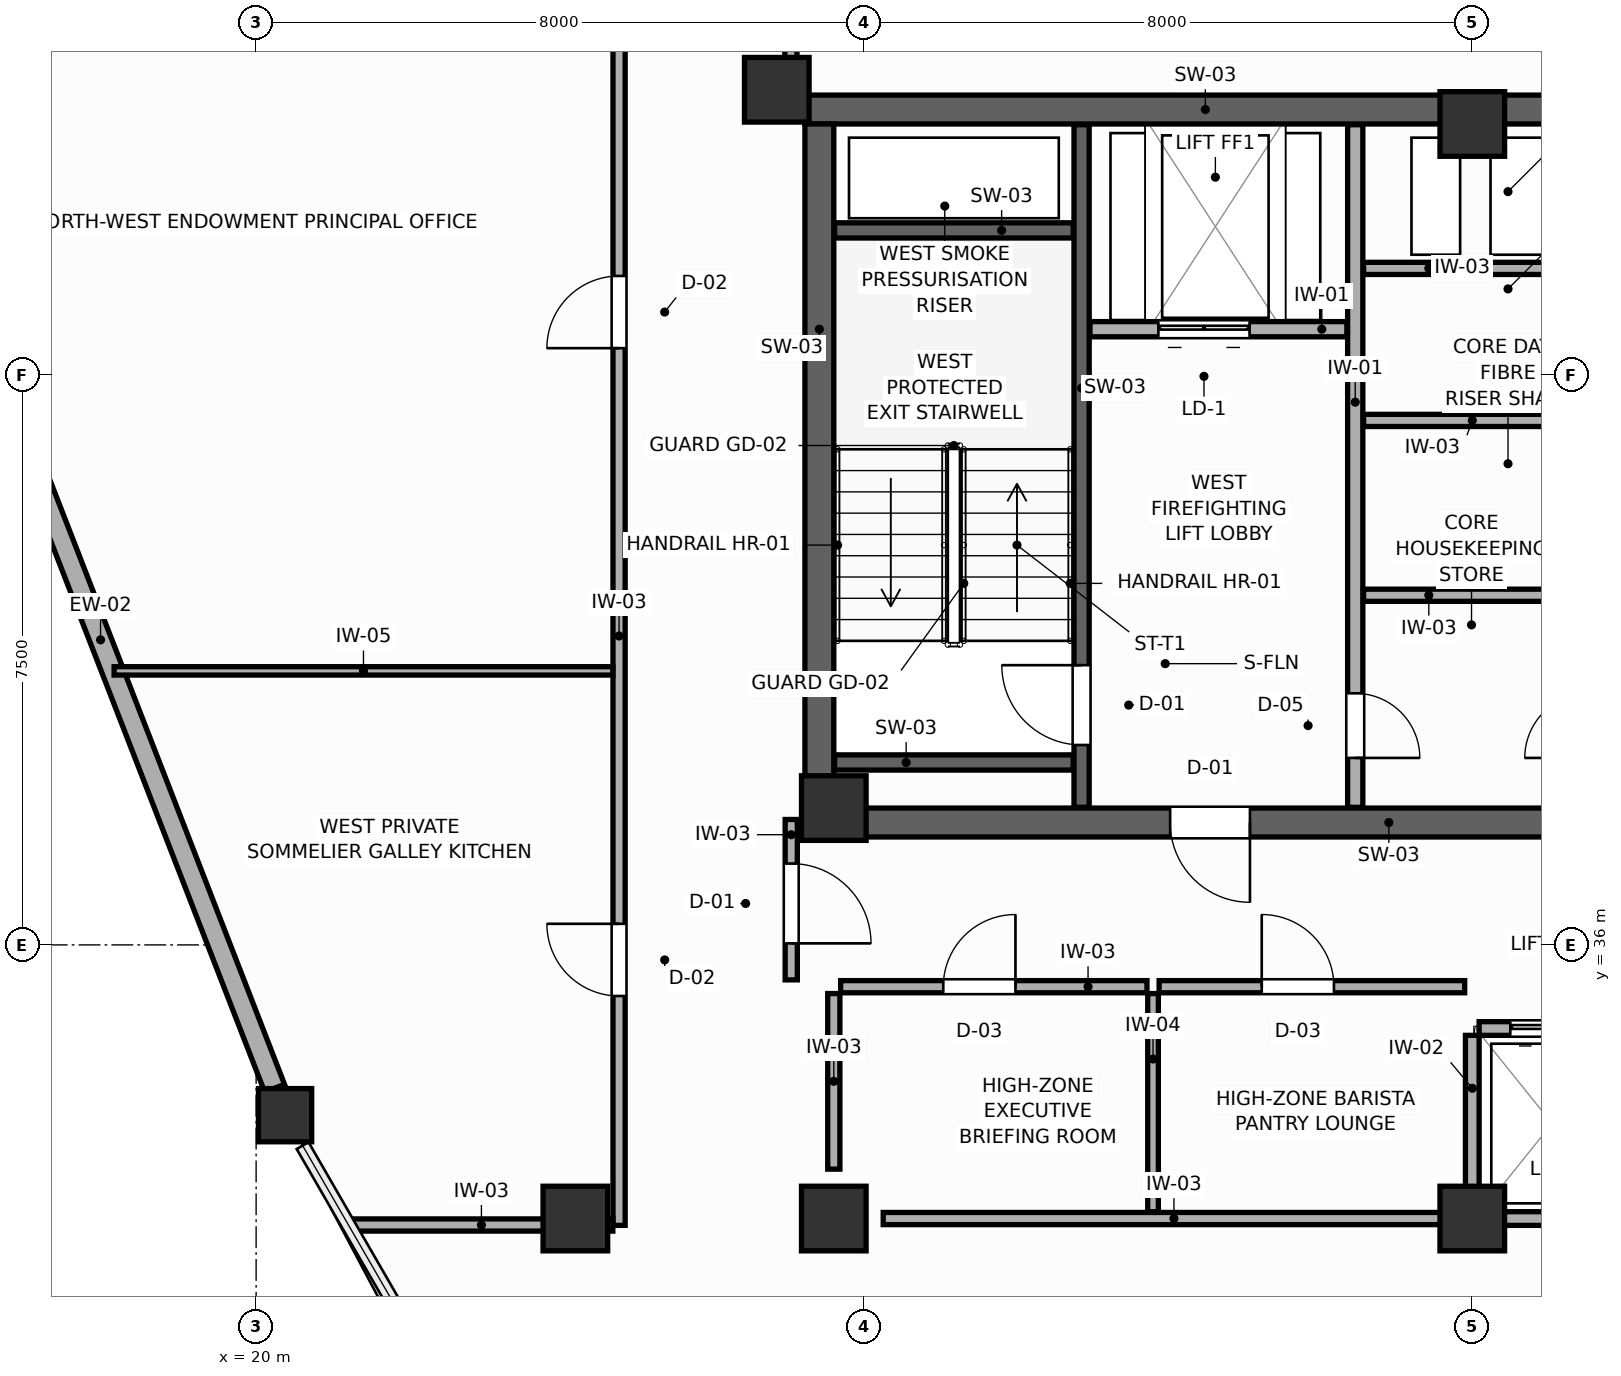
"""IFC4 building model, lengths in metres.
Left out: names, types, materials, properties, quantities, classifications, styles, units other than length and angle.
Written with IfcOpenShell. Run it as: python <this file> out.ifc"""

import sys

from ifc_helpers import new_model, si_unit, direction, frame, frame_2d, origin, origin_2d, place, context, subcontext, project, spatial, rectangle, extrude, source, transform, mapped, element, fill, save


model = new_model("IFC4")
c1 = context("Model", 3, precision=1e-05, world=origin(), true_north=direction((0.0, 1.0)))
c2 = subcontext(c1, "Body", "Model", "MODEL_VIEW")
j1 = project(units=[si_unit("LENGTHUNIT", "METRE"), si_unit("PLANEANGLEUNIT", "RADIAN")], contexts=[c1])
p1 = place(None, origin())
s1 = spatial("IfcSite", under=j1, at=p1, CompositionType="ELEMENT")
p2 = place(p1, origin())
s2 = spatial("IfcBuilding", under=s1, at=p2, CompositionType="ELEMENT")
p3 = place(p2, frame((0.0, 0.0, 264.6)))
s3 = spatial("IfcBuildingStorey", under=s2, at=p3, CompositionType="ELEMENT", Elevation=264.6)
p4 = place(p3, frame((27.22, 46.99, 0.0), z_axis=(0.0, 0.0, 1.0), x_axis=(1.0, 0.0, 0.0)))
e1 = element("IfcWall", 1, at=p4, inside=s3, PredefinedType="SHEAR", context=c2, shape_type="SweptSolid", body=[
    extrude(rectangle(XDim=17.56, YDim=0.38, at=frame_2d((8.78, 0.0))), origin(), (0.0, 0.0, 1.0), 3.6),
])
p5 = place(p3, frame((27.22, 37.61, 0.0), z_axis=(0.0, 0.0, 1.0), x_axis=(1.0, 0.0, 0.0)))
e2 = element("IfcWall", 2, at=p5, inside=s3, PredefinedType="SHEAR", context=c2, shape_type="SweptSolid", body=[
    extrude(rectangle(XDim=17.56, YDim=0.38, at=frame_2d((8.78, 0.0))), origin(), (0.0, 0.0, 1.0), 3.6),
])
p6 = place(p5, frame((4.805, 0.0, 0.0)))
e3 = element("IfcOpeningElement", 3, at=p6, cuts=e2, PredefinedType="OPENING", context=c2, shape_type="SweptSolid", body=[
    extrude(rectangle(XDim=1.05, YDim=2.1, at=frame_2d((0.525, 1.05))), frame((0.0, 0.2, 0.0), z_axis=(0.0, -1.0, 0.0), x_axis=(1.0, 0.0, 0.0)), (0.0, 0.0, 1.0), 0.4),
])
p7 = place(p5, frame((11.705, 0.0, 0.0)))
e4 = element("IfcOpeningElement", 4, at=p7, cuts=e2, PredefinedType="OPENING", context=c2, shape_type="SweptSolid", body=[
    extrude(rectangle(XDim=1.05, YDim=2.1, at=frame_2d((0.525, 1.05))), frame((0.0, 0.2, 0.0), z_axis=(0.0, -1.0, 0.0), x_axis=(1.0, 0.0, 0.0)), (0.0, 0.0, 1.0), 0.4),
])
p8 = place(p3, frame((27.41, 37.8, 0.0), z_axis=(0.0, 0.0, 1.0), x_axis=(0.0, 1.0, 0.0)))
e5 = element("IfcWall", 5, at=p8, inside=s3, PredefinedType="SHEAR", context=c2, shape_type="SweptSolid", body=[
    extrude(rectangle(XDim=9.0, YDim=0.38, at=frame_2d((4.5, 0.0))), origin(), (0.0, 0.0, 1.0), 3.6),
])
m1 = source(origin(), c2, "Body", "SweptSolid", [
    extrude(rectangle(XDim=0.85, YDim=0.85, at=origin_2d()), origin(), (0.0, 0.0, 1.0), 3.6),
])
for number, where, z_axis, x_axis in (
    (6, (26.85, 47.25, 0.0), (0.0, 0.0, 1.0), (1.0, 0.0, 0.0)),
    (7, (27.6, 37.8, 0.0), (0.0, 0.0, 1.0), (1.0, 0.0, 0.0)),
    (8, (27.6, 32.4, 0.0), (0.0, 0.0, 1.0), (1.0, 0.0, 0.0)),
    (9, (36.0, 46.8, 0.0), (0.0, 0.0, 1.0), (1.0, 0.0, 0.0)),
    (10, (36.0, 32.4, 0.0), (0.0, 0.0, 1.0), (1.0, 0.0, 0.0)),
    (11, (24.2, 32.4, 0.0), (0.0, 0.0, 1.0), (1.0, 0.0, 0.0)),
):
    element("IfcColumn", number, at=place(p3, frame(where, z_axis=z_axis, x_axis=x_axis)), inside=s3, PredefinedType="COLUMN", context=c2, shape_type="MappedRepresentation", body=[
        mapped(m1, transform((0.0, 0.0, 0.0), scale=1.0)),
    ])
m2 = source(origin(), c2, "Body", "SweptSolid", [
    extrude(rectangle(XDim=0.7, YDim=0.7, at=origin_2d()), origin(), (0.0, 0.0, 1.0), 3.6),
])
p9 = place(p3, frame((20.381, 33.76, 0.0), z_axis=(0.0, 0.0, 1.0), x_axis=(1.0, 0.0, 0.0)))
e12 = element("IfcColumn", 12, at=p9, inside=s3, PredefinedType="COLUMN", context=c2, shape_type="MappedRepresentation", body=[
    mapped(m2, transform((0.0, 0.0, 0.0), scale=1.0)),
])
p10 = place(p3, frame((15.664, 45.911, 0.0), z_axis=(0.0, 0.0, 1.0), x_axis=(0.3618810561, -0.932224276253, 0.0)))
e13 = element("IfcWall", 13, at=p10, inside=s3, PredefinedType="SOLIDWALL", context=c2, shape_type="SweptSolid", body=[
    extrude(rectangle(XDim=12.654, YDim=0.28, at=frame_2d((6.327, 0.0))), origin(), (0.0, 0.0, 1.0), 3.05),
])
p11 = place(p3, frame((30.86, 37.81, 0.0), z_axis=(0.0, 0.0, 1.0), x_axis=(0.0, 1.0, 0.0)))
e14 = element("IfcWall", 14, at=p11, inside=s3, PredefinedType="SHEAR", context=c2, shape_type="SweptSolid", body=[
    extrude(rectangle(XDim=8.98, YDim=0.2, at=frame_2d((4.49, 0.0))), origin(), (0.0, 0.0, 1.0), 3.6),
])
p12 = place(p11, frame((0.82, 0.0, 0.0)))
e15 = element("IfcOpeningElement", 15, at=p12, cuts=e14, PredefinedType="OPENING", context=c2, shape_type="SweptSolid", body=[
    extrude(rectangle(XDim=1.05, YDim=2.1, at=frame_2d((0.525, 1.05))), frame((0.0, 0.11, 0.0), z_axis=(0.0, -1.0, 0.0), x_axis=(1.0, 0.0, 0.0)), (0.0, 0.0, 1.0), 0.22),
])
for number, where, z_axis, x_axis in (
    (16, (27.61, 45.4, 0.0), (0.0, 0.0, 1.0), (1.0, 0.0, 0.0)),
    (17, (27.61, 38.4, 0.0), (0.0, 0.0, 1.0), (1.0, 0.0, 0.0)),
):
    element("IfcWall", number, at=place(p3, frame(where, z_axis=z_axis, x_axis=x_axis)), inside=s3, PredefinedType="SHEAR", context=c2, shape_type="SweptSolid", body=[
        extrude(rectangle(XDim=3.14, YDim=0.2, at=frame_2d((1.57, 0.0))), origin(), (0.0, 0.0, 1.0), 3.6),
    ])
p13 = place(p3, frame((30.97, 44.1, 0.0), z_axis=(0.0, 0.0, 1.0), x_axis=(1.0, 0.0, 0.0)))
e18 = element("IfcWall", 18, at=p13, inside=s3, PredefinedType="PARTITIONING", context=c2, shape_type="SweptSolid", body=[
    extrude(rectangle(XDim=3.38, YDim=0.2, at=frame_2d((1.69, 0.0))), origin(), (0.0, 0.0, 1.0), 3.41),
])
p14 = place(p13, frame((0.9, 0.0, 0.0)))
e19 = element("IfcOpeningElement", 19, at=p14, cuts=e18, PredefinedType="OPENING", context=c2, shape_type="SweptSolid", body=[
    extrude(rectangle(XDim=1.2, YDim=2.1, at=frame_2d((0.6, 1.05))), frame((0.0, 0.11, 0.0), z_axis=(0.0, -1.0, 0.0), x_axis=(1.0, 0.0, 0.0)), (0.0, 0.0, 1.0), 0.22),
])
p15 = place(p3, frame((34.46, 37.81, 0.0), z_axis=(0.0, 0.0, 1.0), x_axis=(0.0, 1.0, 0.0)))
e20 = element("IfcWall", 20, at=p15, inside=s3, PredefinedType="PARTITIONING", context=c2, shape_type="SweptSolid", body=[
    extrude(rectangle(XDim=8.98, YDim=0.2, at=frame_2d((4.49, 0.0))), origin(), (0.0, 0.0, 1.0), 3.41),
])
p16 = place(p15, frame((0.65, 0.0, 0.0)))
e21 = element("IfcOpeningElement", 21, at=p16, cuts=e20, PredefinedType="OPENING", context=c2, shape_type="SweptSolid", body=[
    extrude(rectangle(XDim=0.85, YDim=2.05, at=frame_2d((0.425, 1.025))), frame((0.0, 0.11, 0.0), z_axis=(0.0, -1.0, 0.0), x_axis=(1.0, 0.0, 0.0)), (0.0, 0.0, 1.0), 0.22),
])
for number, where, z_axis, x_axis in (
    (22, (34.57, 40.6, 0.0), (0.0, 0.0, 1.0), (1.0, 0.0, 0.0)),
    (23, (34.57, 42.9, 0.0), (0.0, 0.0, 1.0), (1.0, 0.0, 0.0)),
    (24, (34.57, 44.9, 0.0), (0.0, 0.0, 1.0), (1.0, 0.0, 0.0)),
):
    element("IfcWall", number, at=place(p3, frame(where, z_axis=z_axis, x_axis=x_axis)), inside=s3, PredefinedType="PARTITIONING", context=c2, shape_type="SweptSolid", body=[
        extrude(rectangle(XDim=2.86, YDim=0.16, at=frame_2d((1.43, 0.0))), origin(), (0.0, 0.0, 1.0), 3.41),
    ])
p17 = place(p3, frame((36.09, 34.9, 0.0), z_axis=(0.0, 0.0, 1.0), x_axis=(1.0, 0.0, 0.0)))
e25 = element("IfcWall", 25, at=p17, inside=s3, PredefinedType="PARTITIONING", context=c2, shape_type="SweptSolid", body=[
    extrude(rectangle(XDim=1.92, YDim=0.18, at=frame_2d((0.96, 0.0))), origin(), (0.0, 0.0, 1.0), 3.41),
])
p18 = place(p17, frame((0.41, 0.0, 0.0)))
e26 = element("IfcOpeningElement", 26, at=p18, cuts=e25, PredefinedType="OPENING", context=c2, shape_type="SweptSolid", body=[
    extrude(rectangle(XDim=1.1, YDim=2.1, at=frame_2d((0.55, 1.05))), frame((0.0, 0.1, 0.0), z_axis=(0.0, -1.0, 0.0), x_axis=(1.0, 0.0, 0.0)), (0.0, 0.0, 1.0), 0.2),
])
p19 = place(p3, frame((36.09, 32.4, 0.0), z_axis=(0.0, 0.0, 1.0), x_axis=(1.0, 0.0, 0.0)))
e27 = element("IfcWall", 27, at=p19, inside=s3, PredefinedType="PARTITIONING", context=c2, shape_type="SweptSolid", body=[
    extrude(rectangle(XDim=1.92, YDim=0.18, at=frame_2d((0.96, 0.0))), origin(), (0.0, 0.0, 1.0), 3.08),
])
p20 = place(p3, frame((36.0, 32.49, 0.0), z_axis=(0.0, 0.0, 1.0), x_axis=(0.0, 1.0, 0.0)))
e28 = element("IfcWall", 28, at=p20, inside=s3, PredefinedType="PARTITIONING", context=c2, shape_type="SweptSolid", body=[
    extrude(rectangle(XDim=2.32, YDim=0.18, at=frame_2d((1.16, 0.0))), origin(), (0.0, 0.0, 1.0), 3.41),
])
p21 = place(p3, frame((28.25, 32.4, 0.0), z_axis=(0.0, 0.0, 1.0), x_axis=(1.0, 0.0, 0.0)))
e29 = element("IfcWall", 29, at=p21, inside=s3, PredefinedType="PARTITIONING", context=c2, shape_type="SweptSolid", body=[
    extrude(rectangle(XDim=7.65, YDim=0.16, at=frame_2d((3.825, 0.0))), origin(), (0.0, 0.0, 1.0), 3.08),
])
p22 = place(p3, frame((27.6, 33.05, 0.0), z_axis=(0.0, 0.0, 1.0), x_axis=(0.0, 1.0, 0.0)))
e30 = element("IfcWall", 30, at=p22, inside=s3, PredefinedType="PARTITIONING", context=c2, shape_type="SweptSolid", body=[
    extrude(rectangle(XDim=2.31, YDim=0.16, at=frame_2d((1.155, 0.0))), origin(), (0.0, 0.0, 1.0), 3.41),
])
p23 = place(p3, frame((31.8, 32.49, 0.0), z_axis=(0.0, 0.0, 1.0), x_axis=(0.0, 1.0, 0.0)))
e31 = element("IfcWall", 31, at=p23, inside=s3, PredefinedType="PARTITIONING", context=c2, shape_type="SweptSolid", body=[
    extrude(rectangle(XDim=2.87, YDim=0.14, at=frame_2d((1.435, 0.0))), origin(), (0.0, 0.0, 1.0), 3.41),
])
p24 = place(p3, frame((27.69, 35.45, 0.0), z_axis=(0.0, 0.0, 1.0), x_axis=(1.0, 0.0, 0.0)))
e32 = element("IfcWall", 32, at=p24, inside=s3, PredefinedType="PARTITIONING", context=c2, shape_type="SweptSolid", body=[
    extrude(rectangle(XDim=4.03, YDim=0.16, at=frame_2d((2.015, 0.0))), origin(), (0.0, 0.0, 1.0), 3.41),
])
p25 = place(p24, frame((1.35, 0.0, 0.0)))
e33 = element("IfcOpeningElement", 33, at=p25, cuts=e32, PredefinedType="OPENING", context=c2, shape_type="SweptSolid", body=[
    extrude(rectangle(XDim=0.95, YDim=2.05, at=frame_2d((0.475, 1.025))), frame((0.0, 0.09, 0.0), z_axis=(0.0, -1.0, 0.0), x_axis=(1.0, 0.0, 0.0)), (0.0, 0.0, 1.0), 0.18),
])
p26 = place(p3, frame((31.88, 35.45, 0.0), z_axis=(0.0, 0.0, 1.0), x_axis=(1.0, 0.0, 0.0)))
e34 = element("IfcWall", 34, at=p26, inside=s3, PredefinedType="PARTITIONING", context=c2, shape_type="SweptSolid", body=[
    extrude(rectangle(XDim=4.02, YDim=0.16, at=frame_2d((2.01, 0.0))), origin(), (0.0, 0.0, 1.0), 3.41),
])
p27 = place(p26, frame((1.35, 0.0, 0.0)))
e35 = element("IfcOpeningElement", 35, at=p27, cuts=e34, PredefinedType="OPENING", context=c2, shape_type="SweptSolid", body=[
    extrude(rectangle(XDim=0.95, YDim=2.05, at=frame_2d((0.475, 1.025))), frame((0.0, 0.09, 0.0), z_axis=(0.0, -1.0, 0.0), x_axis=(1.0, 0.0, 0.0)), (0.0, 0.0, 1.0), 0.18),
])
p28 = place(p3, frame((27.04, 35.54, 0.0), z_axis=(0.0, 0.0, 1.0), x_axis=(0.0, 1.0, 0.0)))
e36 = element("IfcWall", 36, at=p28, inside=s3, PredefinedType="PARTITIONING", context=c2, shape_type="SweptSolid", body=[
    extrude(rectangle(XDim=2.11, YDim=0.16, at=frame_2d((1.055, 0.0))), origin(), (0.0, 0.0, 1.0), 3.41),
])
p29 = place(p28, frame((0.48, 0.0, 0.0)))
e37 = element("IfcOpeningElement", 37, at=p29, cuts=e36, PredefinedType="OPENING", context=c2, shape_type="SweptSolid", body=[
    extrude(rectangle(XDim=1.05, YDim=2.1, at=frame_2d((0.525, 1.05))), frame((0.0, 0.09, 0.0), z_axis=(0.0, -1.0, 0.0), x_axis=(1.0, 0.0, 0.0)), (0.0, 0.0, 1.0), 0.18),
])
p30 = place(p3, frame((24.775, 32.31, 0.0), z_axis=(0.0, 0.0, 1.0), x_axis=(0.0, 1.0, 0.0)))
e38 = element("IfcWall", 38, at=p30, inside=s3, PredefinedType="PARTITIONING", context=c2, shape_type="SweptSolid", body=[
    extrude(rectangle(XDim=17.489, YDim=0.16, at=frame_2d((8.745, 0.0))), origin(), (0.0, 0.0, 1.0), 3.41),
])
p31 = place(p30, frame((3.018, 0.0, 0.0)))
e39 = element("IfcOpeningElement", 39, at=p31, cuts=e38, PredefinedType="OPENING", context=c2, shape_type="SweptSolid", body=[
    extrude(rectangle(XDim=0.95, YDim=2.05, at=frame_2d((0.475, 1.025))), frame((0.0, 0.09, 0.0), z_axis=(0.0, -1.0, 0.0), x_axis=(1.0, 0.0, 0.0)), (0.0, 0.0, 1.0), 0.18),
])
p32 = place(p30, frame((11.541, 0.0, 0.0)))
e40 = element("IfcOpeningElement", 40, at=p32, cuts=e38, PredefinedType="OPENING", context=c2, shape_type="SweptSolid", body=[
    extrude(rectangle(XDim=0.95, YDim=2.05, at=frame_2d((0.475, 1.025))), frame((0.0, 0.09, 0.0), z_axis=(0.0, -1.0, 0.0), x_axis=(1.0, 0.0, 0.0)), (0.0, 0.0, 1.0), 0.18),
])
p33 = place(p3, frame((21.235, 32.315, 0.0), z_axis=(0.0, 0.0, 1.0), x_axis=(1.0, 0.0, 0.0)))
e41 = element("IfcWall", 41, at=p33, inside=s3, PredefinedType="PARTITIONING", context=c2, shape_type="SweptSolid", body=[
    extrude(rectangle(XDim=3.458, YDim=0.16, at=frame_2d((1.729, 0.0))), origin(), (0.0, 0.0, 1.0), 3.08),
])
p34 = place(p3, frame((27.035, 47.183, 0.0), z_axis=(0.0, 0.0, 1.0), x_axis=(0.0, 1.0, 0.0)))
e42 = element("IfcWall", 42, at=p34, inside=s3, PredefinedType="PARTITIONING", context=c2, shape_type="SweptSolid", body=[
    extrude(rectangle(XDim=2.965, YDim=0.16, at=frame_2d((1.483, 0.0))), origin(), (0.0, 0.0, 1.0), 3.41),
])
p35 = place(p34, frame((1.635, 0.0, 0.0)))
e43 = element("IfcOpeningElement", 43, at=p35, cuts=e42, PredefinedType="OPENING", context=c2, shape_type="SweptSolid", body=[
    extrude(rectangle(XDim=0.95, YDim=2.05, at=frame_2d((0.475, 1.025))), frame((0.0, 0.09, 0.0), z_axis=(0.0, -1.0, 0.0), x_axis=(1.0, 0.0, 0.0)), (0.0, 0.0, 1.0), 0.18),
])
p36 = place(p3, frame((18.132, 39.605, 0.0), z_axis=(0.0, 0.0, 1.0), x_axis=(1.0, 0.0, 0.0)))
e44 = element("IfcWall", 44, at=p36, inside=s3, PredefinedType="MOVABLE", context=c2, shape_type="SweptSolid", body=[
    extrude(rectangle(XDim=6.562, YDim=0.11, at=frame_2d((3.281, 0.0))), origin(), (0.0, 0.0, 1.0), 3.41),
])
p37 = place(p12, origin())
e45 = element("IfcDoor", 45, at=p37, inside=s3, OperationType="SINGLE_SWING_RIGHT", PredefinedType="DOOR", context=c2, shape_type="SweptSolid", body=[
    extrude(rectangle(XDim=1.05, YDim=2.1, at=frame_2d((0.525, 1.05))), frame((0.0, 0.025, 0.0), z_axis=(0.0, -1.0, 0.0), x_axis=(1.0, 0.0, 0.0)), (0.0, 0.0, 1.0), 0.05),
])
fill(e15, e45)
p38 = place(p14, origin())
e46 = element("IfcDoor", 46, at=p38, inside=s3, OperationType="DOUBLE_DOOR_SLIDING", PredefinedType="DOOR", context=c2, shape_type="SweptSolid", body=[
    extrude(rectangle(XDim=1.2, YDim=2.1, at=frame_2d((0.6, 1.05))), frame((0.0, 0.025, 0.0), z_axis=(0.0, -1.0, 0.0), x_axis=(1.0, 0.0, 0.0)), (0.0, 0.0, 1.0), 0.05),
])
fill(e19, e46)
p39 = place(p16, frame((0.85, 0.0, 0.0), z_axis=(0.0, 0.0, 1.0), x_axis=(-1.0, 0.0, 0.0)))
e47 = element("IfcDoor", 47, at=p39, inside=s3, OperationType="SINGLE_SWING_RIGHT", PredefinedType="DOOR", context=c2, shape_type="SweptSolid", body=[
    extrude(rectangle(XDim=0.85, YDim=2.05, at=frame_2d((0.425, 1.025))), frame((0.0, 0.025, 0.0), z_axis=(0.0, -1.0, 0.0), x_axis=(1.0, 0.0, 0.0)), (0.0, 0.0, 1.0), 0.05),
])
fill(e21, e47)
p40 = place(p18, origin())
e48 = element("IfcDoor", 48, at=p40, inside=s3, OperationType="DOUBLE_DOOR_SLIDING", PredefinedType="DOOR", context=c2, shape_type="SweptSolid", body=[
    extrude(rectangle(XDim=1.1, YDim=2.1, at=frame_2d((0.55, 1.05))), frame((0.0, 0.025, 0.0), z_axis=(0.0, -1.0, 0.0), x_axis=(1.0, 0.0, 0.0)), (0.0, 0.0, 1.0), 0.05),
])
fill(e26, e48)
p41 = place(p25, origin())
e49 = element("IfcDoor", 49, at=p41, inside=s3, OperationType="SINGLE_SWING_RIGHT", PredefinedType="DOOR", context=c2, shape_type="SweptSolid", body=[
    extrude(rectangle(XDim=0.95, YDim=2.05, at=frame_2d((0.475, 1.025))), frame((0.0, 0.025, 0.0), z_axis=(0.0, -1.0, 0.0), x_axis=(1.0, 0.0, 0.0)), (0.0, 0.0, 1.0), 0.05),
])
fill(e33, e49)
p42 = place(p27, origin())
e50 = element("IfcDoor", 50, at=p42, inside=s3, OperationType="SINGLE_SWING_LEFT", PredefinedType="DOOR", context=c2, shape_type="SweptSolid", body=[
    extrude(rectangle(XDim=0.95, YDim=2.05, at=frame_2d((0.475, 1.025))), frame((0.0, 0.025, 0.0), z_axis=(0.0, -1.0, 0.0), x_axis=(1.0, 0.0, 0.0)), (0.0, 0.0, 1.0), 0.05),
])
fill(e35, e50)
p43 = place(p29, frame((1.05, 0.0, 0.0), z_axis=(0.0, 0.0, 1.0), x_axis=(-1.0, 0.0, 0.0)))
e51 = element("IfcDoor", 51, at=p43, inside=s3, OperationType="SINGLE_SWING_RIGHT", PredefinedType="DOOR", context=c2, shape_type="SweptSolid", body=[
    extrude(rectangle(XDim=1.05, YDim=2.1, at=frame_2d((0.525, 1.05))), frame((0.0, 0.025, 0.0), z_axis=(0.0, -1.0, 0.0), x_axis=(1.0, 0.0, 0.0)), (0.0, 0.0, 1.0), 0.05),
])
fill(e37, e51)
p44 = place(p31, origin())
e52 = element("IfcDoor", 52, at=p44, inside=s3, OperationType="SINGLE_SWING_RIGHT", PredefinedType="DOOR", context=c2, shape_type="SweptSolid", body=[
    extrude(rectangle(XDim=0.95, YDim=2.05, at=frame_2d((0.475, 1.025))), frame((0.0, 0.025, 0.0), z_axis=(0.0, -1.0, 0.0), x_axis=(1.0, 0.0, 0.0)), (0.0, 0.0, 1.0), 0.05),
])
fill(e39, e52)
p45 = place(p32, origin())
e53 = element("IfcDoor", 53, at=p45, inside=s3, OperationType="SINGLE_SWING_LEFT", PredefinedType="DOOR", context=c2, shape_type="SweptSolid", body=[
    extrude(rectangle(XDim=0.95, YDim=2.05, at=frame_2d((0.475, 1.025))), frame((0.0, 0.025, 0.0), z_axis=(0.0, -1.0, 0.0), x_axis=(1.0, 0.0, 0.0)), (0.0, 0.0, 1.0), 0.05),
])
fill(e40, e53)
p46 = place(p6, frame((1.05, 0.0, 0.0), z_axis=(0.0, 0.0, 1.0), x_axis=(-1.0, 0.0, 0.0)))
e54 = element("IfcDoor", 54, at=p46, inside=s3, OperationType="SINGLE_SWING_LEFT", PredefinedType="DOOR", context=c2, shape_type="SweptSolid", body=[
    extrude(rectangle(XDim=1.05, YDim=2.1, at=frame_2d((0.525, 1.05))), frame((0.0, 0.025, 0.0), z_axis=(0.0, -1.0, 0.0), x_axis=(1.0, 0.0, 0.0)), (0.0, 0.0, 1.0), 0.05),
])
fill(e3, e54)
save(model, sys.argv[1])
